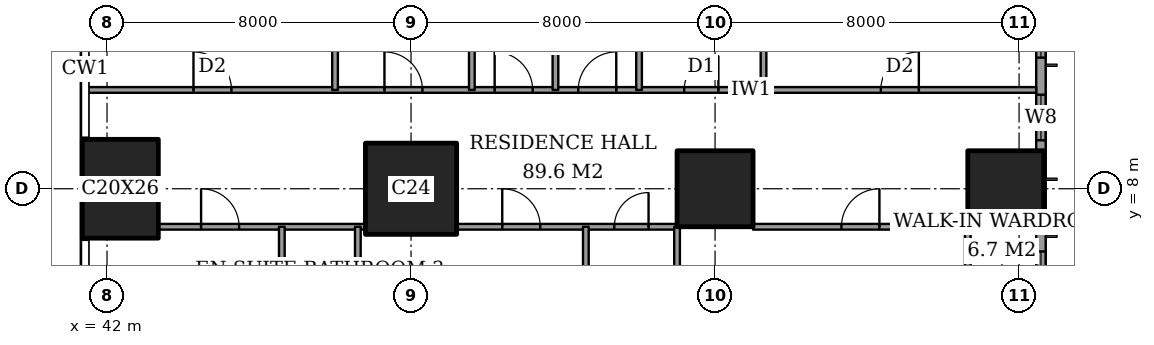
"""IFC4 building model, lengths in metres.
Left out: names, types, materials, properties, quantities, classifications, styles, units other than length and angle.
Written with IfcOpenShell. Run it as: python <this file> out.ifc"""

import sys

from ifc_helpers import new_model, si_unit, direction, frame, frame_2d, origin, origin_2d, place, context, subcontext, project, spatial, rectangle, extrude, element, fill, save


model = new_model("IFC4")
c1 = context("Model", 3, precision=1e-05, world=origin(), true_north=direction((0.0, 1.0)))
c2 = subcontext(c1, "Body", "Model", "MODEL_VIEW")
j1 = project(units=[si_unit("LENGTHUNIT", "METRE"), si_unit("PLANEANGLEUNIT", "RADIAN")], contexts=[c1])
p1 = place(None, origin())
s1 = spatial("IfcSite", under=j1, at=p1, CompositionType="ELEMENT")
p2 = place(p1, origin())
s2 = spatial("IfcBuilding", under=s1, at=p2, CompositionType="ELEMENT")
p3 = place(p2, frame((0.0, 0.0, 76.4)))
s3 = spatial("IfcBuildingStorey", under=s2, at=p3, CompositionType="ELEMENT", Elevation=76.4)
p4 = place(p3, frame((42.35, 8.0, 0.0), z_axis=(0.0, 0.0, 1.0), x_axis=(1.0, 0.0, 0.0)))
e1 = element("IfcColumn", 1, at=p4, inside=s3, PredefinedType="COLUMN", context=c2, shape_type="SweptSolid", body=[
    extrude(rectangle(XDim=2.0, YDim=2.6, at=origin_2d()), origin(), (0.0, 0.0, 1.0), 3.6),
])
p5 = place(p3, frame((50.0, 8.0, 0.0), z_axis=(0.0, 0.0, 1.0), x_axis=(1.0, 0.0, 0.0)))
e2 = element("IfcColumn", 2, at=p5, inside=s3, PredefinedType="COLUMN", context=c2, shape_type="SweptSolid", body=[
    extrude(rectangle(XDim=2.4, YDim=2.4, at=origin_2d()), origin(), (0.0, 0.0, 1.0), 3.6),
])
for number, where, z_axis, x_axis in (
    (3, (58.0, 8.0, 0.0), (0.0, 0.0, 1.0), (1.0, 0.0, 0.0)),
    (4, (65.65, 8.0, 0.0), (0.0, 0.0, 1.0), (1.0, 0.0, 0.0)),
):
    element("IfcColumn", number, at=place(p3, frame(where, z_axis=z_axis, x_axis=x_axis)), inside=s3, PredefinedType="COLUMN", context=c2, shape_type="SweptSolid", body=[
        extrude(rectangle(XDim=2.0, YDim=2.0, at=origin_2d()), origin(), (0.0, 0.0, 1.0), 3.6),
    ])
p6 = place(p3, frame((66.575, 3.175, 0.0), z_axis=(0.0, 0.0, 1.0), x_axis=(0.0, 1.0, 0.0)))
e5 = element("IfcWall", 5, at=p6, inside=s3, PredefinedType="SOLIDWALL", context=c2, shape_type="SweptSolid", body=[
    extrude(rectangle(XDim=41.65, YDim=0.25, at=frame_2d((20.825, 0.0))), origin(), (0.0, 0.0, 1.0), 3.6),
])
p7 = place(p6, frame((0.775, 0.0, 0.6)))
e6 = element("IfcOpeningElement", 6, at=p7, cuts=e5, PredefinedType="OPENING", context=c2, shape_type="SweptSolid", body=[
    extrude(rectangle(XDim=2.4, YDim=2.0, at=frame_2d((1.2, 1.0))), frame((0.0, 0.135, 0.0), z_axis=(0.0, -1.0, 0.0), x_axis=(1.0, 0.0, 0.0)), (0.0, 0.0, 1.0), 0.27),
])
p8 = place(p6, frame((6.1, 0.0, 0.6)))
e7 = element("IfcOpeningElement", 7, at=p8, cuts=e5, PredefinedType="OPENING", context=c2, shape_type="SweptSolid", body=[
    extrude(rectangle(XDim=1.2, YDim=2.0, at=frame_2d((0.6, 1.0))), frame((0.0, 0.135, 0.0), z_axis=(0.0, -1.0, 0.0), x_axis=(1.0, 0.0, 0.0)), (0.0, 0.0, 1.0), 0.27),
])
p9 = place(p6, frame((8.275, 0.0, 0.6)))
e8 = element("IfcOpeningElement", 8, at=p9, cuts=e5, PredefinedType="OPENING", context=c2, shape_type="SweptSolid", body=[
    extrude(rectangle(XDim=2.4, YDim=2.0, at=frame_2d((1.2, 1.0))), frame((0.0, 0.135, 0.0), z_axis=(0.0, -1.0, 0.0), x_axis=(1.0, 0.0, 0.0)), (0.0, 0.0, 1.0), 0.27),
])
p10 = place(p6, frame((15.775, 0.0, 0.6)))
e9 = element("IfcOpeningElement", 9, at=p10, cuts=e5, PredefinedType="OPENING", context=c2, shape_type="SweptSolid", body=[
    extrude(rectangle(XDim=2.4, YDim=2.0, at=frame_2d((1.2, 1.0))), frame((0.0, 0.135, 0.0), z_axis=(0.0, -1.0, 0.0), x_axis=(1.0, 0.0, 0.0)), (0.0, 0.0, 1.0), 0.27),
])
p11 = place(p6, frame((23.475, 0.0, 0.6)))
e10 = element("IfcOpeningElement", 10, at=p11, cuts=e5, PredefinedType="OPENING", context=c2, shape_type="SweptSolid", body=[
    extrude(rectangle(XDim=2.4, YDim=2.0, at=frame_2d((1.2, 1.0))), frame((0.0, 0.135, 0.0), z_axis=(0.0, -1.0, 0.0), x_axis=(1.0, 0.0, 0.0)), (0.0, 0.0, 1.0), 0.27),
])
p12 = place(p6, frame((30.975, 0.0, 0.6)))
e11 = element("IfcOpeningElement", 11, at=p12, cuts=e5, PredefinedType="OPENING", context=c2, shape_type="SweptSolid", body=[
    extrude(rectangle(XDim=2.4, YDim=2.0, at=frame_2d((1.2, 1.0))), frame((0.0, 0.135, 0.0), z_axis=(0.0, -1.0, 0.0), x_axis=(1.0, 0.0, 0.0)), (0.0, 0.0, 1.0), 0.27),
])
p13 = place(p6, frame((34.5, 0.0, 0.6)))
e12 = element("IfcOpeningElement", 12, at=p13, cuts=e5, PredefinedType="OPENING", context=c2, shape_type="SweptSolid", body=[
    extrude(rectangle(XDim=1.2, YDim=2.0, at=frame_2d((0.6, 1.0))), frame((0.0, 0.135, 0.0), z_axis=(0.0, -1.0, 0.0), x_axis=(1.0, 0.0, 0.0)), (0.0, 0.0, 1.0), 0.27),
])
p14 = place(p6, frame((38.475, 0.0, 0.6)))
e13 = element("IfcOpeningElement", 13, at=p14, cuts=e5, PredefinedType="OPENING", context=c2, shape_type="SweptSolid", body=[
    extrude(rectangle(XDim=2.4, YDim=2.0, at=frame_2d((1.2, 1.0))), frame((0.0, 0.135, 0.0), z_axis=(0.0, -1.0, 0.0), x_axis=(1.0, 0.0, 0.0)), (0.0, 0.0, 1.0), 0.27),
])
p15 = place(p3, frame((43.35, 7.0, 0.0), z_axis=(0.0, 0.0, 1.0), x_axis=(1.0, 0.0, 0.0)))
e14 = element("IfcWall", 14, at=p15, inside=s3, PredefinedType="PARTITIONING", context=c2, shape_type="SweptSolid", body=[
    extrude(rectangle(XDim=5.45, YDim=0.15, at=frame_2d((2.725, 0.0))), origin(), (0.0, 0.0, 1.0), 3.35),
])
p16 = place(p15, frame((1.125, 0.0, 0.0)))
e15 = element("IfcOpeningElement", 15, at=p16, cuts=e14, PredefinedType="OPENING", context=c2, shape_type="SweptSolid", body=[
    extrude(rectangle(XDim=1.0, YDim=2.1, at=frame_2d((0.5, 1.05))), frame((0.0, 0.085, 0.0), z_axis=(0.0, -1.0, 0.0), x_axis=(1.0, 0.0, 0.0)), (0.0, 0.0, 1.0), 0.17),
])
p17 = place(p3, frame((51.2, 7.0, 0.0), z_axis=(0.0, 0.0, 1.0), x_axis=(1.0, 0.0, 0.0)))
e16 = element("IfcWall", 16, at=p17, inside=s3, PredefinedType="PARTITIONING", context=c2, shape_type="SweptSolid", body=[
    extrude(rectangle(XDim=5.8, YDim=0.15, at=frame_2d((2.9, 0.0))), origin(), (0.0, 0.0, 1.0), 3.35),
])
p18 = place(p17, frame((4.15, 0.0, 0.0)))
e17 = element("IfcOpeningElement", 17, at=p18, cuts=e16, PredefinedType="OPENING", context=c2, shape_type="SweptSolid", body=[
    extrude(rectangle(XDim=0.9, YDim=2.1, at=frame_2d((0.45, 1.05))), frame((0.0, 0.085, 0.0), z_axis=(0.0, -1.0, 0.0), x_axis=(1.0, 0.0, 0.0)), (0.0, 0.0, 1.0), 0.17),
])
p19 = place(p17, frame((1.2, 0.0, 0.0)))
e18 = element("IfcOpeningElement", 18, at=p19, cuts=e16, PredefinedType="OPENING", context=c2, shape_type="SweptSolid", body=[
    extrude(rectangle(XDim=1.0, YDim=2.1, at=frame_2d((0.5, 1.05))), frame((0.0, 0.085, 0.0), z_axis=(0.0, -1.0, 0.0), x_axis=(1.0, 0.0, 0.0)), (0.0, 0.0, 1.0), 0.17),
])
p20 = place(p3, frame((59.0, 7.0, 0.0), z_axis=(0.0, 0.0, 1.0), x_axis=(1.0, 0.0, 0.0)))
e19 = element("IfcWall", 19, at=p20, inside=s3, PredefinedType="PARTITIONING", context=c2, shape_type="SweptSolid", body=[
    extrude(rectangle(XDim=5.65, YDim=0.15, at=frame_2d((2.825, 0.0))), origin(), (0.0, 0.0, 1.0), 3.35),
])
p21 = place(p20, frame((2.325, 0.0, 0.0)))
e20 = element("IfcOpeningElement", 20, at=p21, cuts=e19, PredefinedType="OPENING", context=c2, shape_type="SweptSolid", body=[
    extrude(rectangle(XDim=1.0, YDim=2.1, at=frame_2d((0.5, 1.05))), frame((0.0, 0.085, 0.0), z_axis=(0.0, -1.0, 0.0), x_axis=(1.0, 0.0, 0.0)), (0.0, 0.0, 1.0), 0.17),
])
p22 = place(p3, frame((41.439, 10.6, 0.0), z_axis=(0.0, 0.0, 1.0), x_axis=(1.0, 0.0, 0.0)))
e21 = element("IfcWall", 21, at=p22, inside=s3, PredefinedType="PARTITIONING", context=c2, shape_type="SweptSolid", body=[
    extrude(rectangle(XDim=25.011, YDim=0.15, at=frame_2d((12.505, 0.0))), origin(), (0.0, 0.0, 1.0), 3.35),
])
p23 = place(p22, frame((10.761, 0.0, 0.0)))
e22 = element("IfcOpeningElement", 22, at=p23, cuts=e21, PredefinedType="OPENING", context=c2, shape_type="SweptSolid", body=[
    extrude(rectangle(XDim=1.0, YDim=2.1, at=frame_2d((0.5, 1.05))), frame((0.0, 0.085, 0.0), z_axis=(0.0, -1.0, 0.0), x_axis=(1.0, 0.0, 0.0)), (0.0, 0.0, 1.0), 0.17),
])
p24 = place(p22, frame((20.924, 0.0, 0.0)))
e23 = element("IfcOpeningElement", 23, at=p24, cuts=e21, PredefinedType="OPENING", context=c2, shape_type="SweptSolid", body=[
    extrude(rectangle(XDim=1.0, YDim=2.1, at=frame_2d((0.5, 1.05))), frame((0.0, 0.085, 0.0), z_axis=(0.0, -1.0, 0.0), x_axis=(1.0, 0.0, 0.0)), (0.0, 0.0, 1.0), 0.17),
])
p25 = place(p22, frame((15.749, 0.0, 0.0)))
e24 = element("IfcOpeningElement", 24, at=p25, cuts=e21, PredefinedType="OPENING", context=c2, shape_type="SweptSolid", body=[
    extrude(rectangle(XDim=0.9, YDim=2.1, at=frame_2d((0.45, 1.05))), frame((0.0, 0.085, 0.0), z_axis=(0.0, -1.0, 0.0), x_axis=(1.0, 0.0, 0.0)), (0.0, 0.0, 1.0), 0.17),
])
p26 = place(p22, frame((12.961, 0.0, 0.0)))
e25 = element("IfcOpeningElement", 25, at=p26, cuts=e21, PredefinedType="OPENING", context=c2, shape_type="SweptSolid", body=[
    extrude(rectangle(XDim=1.0, YDim=2.1, at=frame_2d((0.5, 1.05))), frame((0.0, 0.085, 0.0), z_axis=(0.0, -1.0, 0.0), x_axis=(1.0, 0.0, 0.0)), (0.0, 0.0, 1.0), 0.17),
])
p27 = place(p22, frame((7.861, 0.0, 0.0)))
e26 = element("IfcOpeningElement", 26, at=p27, cuts=e21, PredefinedType="OPENING", context=c2, shape_type="SweptSolid", body=[
    extrude(rectangle(XDim=1.0, YDim=2.1, at=frame_2d((0.5, 1.05))), frame((0.0, 0.085, 0.0), z_axis=(0.0, -1.0, 0.0), x_axis=(1.0, 0.0, 0.0)), (0.0, 0.0, 1.0), 0.17),
])
p28 = place(p22, frame((2.836, 0.0, 0.0)))
e27 = element("IfcOpeningElement", 27, at=p28, cuts=e21, PredefinedType="OPENING", context=c2, shape_type="SweptSolid", body=[
    extrude(rectangle(XDim=1.0, YDim=2.1, at=frame_2d((0.5, 1.05))), frame((0.0, 0.085, 0.0), z_axis=(0.0, -1.0, 0.0), x_axis=(1.0, 0.0, 0.0)), (0.0, 0.0, 1.0), 0.17),
])
p29 = place(p3, frame((46.6, -0.45, 0.0), z_axis=(0.0, 0.0, 1.0), x_axis=(0.0, 1.0, 0.0)))
e28 = element("IfcWall", 28, at=p29, inside=s3, PredefinedType="PARTITIONING", context=c2, shape_type="SweptSolid", body=[
    extrude(rectangle(XDim=7.45, YDim=0.15, at=frame_2d((3.725, 0.0))), origin(), (0.0, 0.0, 1.0), 3.35),
])
p30 = place(p29, frame((3.275, 0.0, 0.0)))
e29 = element("IfcOpeningElement", 29, at=p30, cuts=e28, PredefinedType="OPENING", context=c2, shape_type="SweptSolid", body=[
    extrude(rectangle(XDim=0.9, YDim=2.1, at=frame_2d((0.45, 1.05))), frame((0.0, 0.085, 0.0), z_axis=(0.0, -1.0, 0.0), x_axis=(1.0, 0.0, 0.0)), (0.0, 0.0, 1.0), 0.17),
])
p31 = place(p3, frame((48.0, 10.6, 0.0), z_axis=(0.0, 0.0, 1.0), x_axis=(0.0, 1.0, 0.0)))
e30 = element("IfcWall", 30, at=p31, inside=s3, PredefinedType="PARTITIONING", context=c2, shape_type="SweptSolid", body=[
    extrude(rectangle(XDim=6.4, YDim=0.15, at=frame_2d((3.2, 0.0))), origin(), (0.0, 0.0, 1.0), 3.35),
])
p32 = place(p3, frame((48.6, -0.45, 0.0), z_axis=(0.0, 0.0, 1.0), x_axis=(0.0, 1.0, 0.0)))
e31 = element("IfcWall", 31, at=p32, inside=s3, PredefinedType="PARTITIONING", context=c2, shape_type="SweptSolid", body=[
    extrude(rectangle(XDim=7.45, YDim=0.15, at=frame_2d((3.725, 0.0))), origin(), (0.0, 0.0, 1.0), 3.35),
])
for number, where, z_axis, x_axis in (
    (32, (51.6, 10.6, 0.0), (0.0, 0.0, 1.0), (0.0, 1.0, 0.0)),
    (33, (53.8, 10.6, 0.0), (0.0, 0.0, 1.0), (0.0, 1.0, 0.0)),
):
    element("IfcWall", number, at=place(p3, frame(where, z_axis=z_axis, x_axis=x_axis)), inside=s3, PredefinedType="PARTITIONING", context=c2, shape_type="SweptSolid", body=[
        extrude(rectangle(XDim=6.4, YDim=0.15, at=frame_2d((3.2, 0.0))), origin(), (0.0, 0.0, 1.0), 3.35),
    ])
p33 = place(p3, frame((54.6, -0.45, 0.0), z_axis=(0.0, 0.0, 1.0), x_axis=(0.0, 1.0, 0.0)))
e34 = element("IfcWall", 34, at=p33, inside=s3, PredefinedType="PARTITIONING", context=c2, shape_type="SweptSolid", body=[
    extrude(rectangle(XDim=7.45, YDim=0.15, at=frame_2d((3.725, 0.0))), origin(), (0.0, 0.0, 1.0), 3.35),
])
p34 = place(p3, frame((56.0, 10.6, 0.0), z_axis=(0.0, 0.0, 1.0), x_axis=(0.0, 1.0, 0.0)))
e35 = element("IfcWall", 35, at=p34, inside=s3, PredefinedType="PARTITIONING", context=c2, shape_type="SweptSolid", body=[
    extrude(rectangle(XDim=11.0, YDim=0.15, at=frame_2d((5.5, 0.0))), origin(), (0.0, 0.0, 1.0), 3.35),
])
p35 = place(p34, frame((8.2, 0.0, 0.0)))
e36 = element("IfcOpeningElement", 36, at=p35, cuts=e35, PredefinedType="OPENING", context=c2, shape_type="SweptSolid", body=[
    extrude(rectangle(XDim=1.0, YDim=2.1, at=frame_2d((0.5, 1.05))), frame((0.0, 0.085, 0.0), z_axis=(0.0, -1.0, 0.0), x_axis=(1.0, 0.0, 0.0)), (0.0, 0.0, 1.0), 0.17),
])
p36 = place(p3, frame((57.0, 1.35, 0.0), z_axis=(0.0, 0.0, 1.0), x_axis=(0.0, 1.0, 0.0)))
e37 = element("IfcWall", 37, at=p36, inside=s3, PredefinedType="PARTITIONING", context=c2, shape_type="SweptSolid", body=[
    extrude(rectangle(XDim=5.65, YDim=0.15, at=frame_2d((2.825, 0.0))), origin(), (0.0, 0.0, 1.0), 3.35),
])
p37 = place(p3, frame((59.275, 10.6, 0.0), z_axis=(0.0, 0.0, 1.0), x_axis=(0.0, 1.0, 0.0)))
e38 = element("IfcWall", 38, at=p37, inside=s3, PredefinedType="PARTITIONING", context=c2, shape_type="SweptSolid", body=[
    extrude(rectangle(XDim=4.2, YDim=0.15, at=frame_2d((2.1, 0.0))), origin(), (0.0, 0.0, 1.0), 3.35),
])
p38 = place(p3, frame((64.65, 3.3, 0.0), z_axis=(0.0, 0.0, 1.0), x_axis=(0.0, 1.0, 0.0)))
e39 = element("IfcWall", 39, at=p38, inside=s3, PredefinedType="PARTITIONING", context=c2, shape_type="SweptSolid", body=[
    extrude(rectangle(XDim=3.7, YDim=0.15, at=frame_2d((1.85, 0.0))), origin(), (0.0, 0.0, 1.0), 3.35),
])
p39 = place(p38, frame((1.4, 0.0, 0.0)))
e40 = element("IfcOpeningElement", 40, at=p39, cuts=e39, PredefinedType="OPENING", context=c2, shape_type="SweptSolid", body=[
    extrude(rectangle(XDim=0.9, YDim=2.1, at=frame_2d((0.45, 1.05))), frame((0.0, 0.085, 0.0), z_axis=(0.0, -1.0, 0.0), x_axis=(1.0, 0.0, 0.0)), (0.0, 0.0, 1.0), 0.17),
])
p40 = place(p7, origin())
e41 = element("IfcWindow", 41, at=p40, inside=s3, PartitioningType="SINGLE_PANEL", PredefinedType="WINDOW", context=c2, shape_type="SweptSolid", body=[
    extrude(rectangle(XDim=2.4, YDim=2.0, at=frame_2d((1.2, 1.0))), frame((0.0, 0.03, 0.0), z_axis=(0.0, -1.0, 0.0), x_axis=(1.0, 0.0, 0.0)), (0.0, 0.0, 1.0), 0.06),
])
fill(e6, e41)
p41 = place(p8, origin())
e42 = element("IfcWindow", 42, at=p41, inside=s3, PartitioningType="SINGLE_PANEL", PredefinedType="WINDOW", context=c2, shape_type="SweptSolid", body=[
    extrude(rectangle(XDim=1.2, YDim=2.0, at=frame_2d((0.6, 1.0))), frame((0.0, 0.03, 0.0), z_axis=(0.0, -1.0, 0.0), x_axis=(1.0, 0.0, 0.0)), (0.0, 0.0, 1.0), 0.06),
])
fill(e7, e42)
p42 = place(p9, origin())
e43 = element("IfcWindow", 43, at=p42, inside=s3, PartitioningType="SINGLE_PANEL", PredefinedType="WINDOW", context=c2, shape_type="SweptSolid", body=[
    extrude(rectangle(XDim=2.4, YDim=2.0, at=frame_2d((1.2, 1.0))), frame((0.0, 0.03, 0.0), z_axis=(0.0, -1.0, 0.0), x_axis=(1.0, 0.0, 0.0)), (0.0, 0.0, 1.0), 0.06),
])
fill(e8, e43)
p43 = place(p21, origin())
e44 = element("IfcDoor", 44, at=p43, inside=s3, OperationType="SINGLE_SWING_LEFT", PredefinedType="DOOR", context=c2, shape_type="SweptSolid", body=[
    extrude(rectangle(XDim=1.0, YDim=2.1, at=frame_2d((0.5, 1.05))), frame((0.0, 0.025, 0.0), z_axis=(0.0, -1.0, 0.0), x_axis=(1.0, 0.0, 0.0)), (0.0, 0.0, 1.0), 0.05),
])
fill(e20, e44)
p44 = place(p18, origin())
e45 = element("IfcDoor", 45, at=p44, inside=s3, OperationType="SINGLE_SWING_LEFT", PredefinedType="DOOR", context=c2, shape_type="SweptSolid", body=[
    extrude(rectangle(XDim=0.9, YDim=2.1, at=frame_2d((0.45, 1.05))), frame((0.0, 0.025, 0.0), z_axis=(0.0, -1.0, 0.0), x_axis=(1.0, 0.0, 0.0)), (0.0, 0.0, 1.0), 0.05),
])
fill(e17, e45)
p45 = place(p19, origin())
e46 = element("IfcDoor", 46, at=p45, inside=s3, OperationType="SINGLE_SWING_RIGHT", PredefinedType="DOOR", context=c2, shape_type="SweptSolid", body=[
    extrude(rectangle(XDim=1.0, YDim=2.1, at=frame_2d((0.5, 1.05))), frame((0.0, 0.025, 0.0), z_axis=(0.0, -1.0, 0.0), x_axis=(1.0, 0.0, 0.0)), (0.0, 0.0, 1.0), 0.05),
])
fill(e18, e46)
p46 = place(p16, origin())
e47 = element("IfcDoor", 47, at=p46, inside=s3, OperationType="SINGLE_SWING_RIGHT", PredefinedType="DOOR", context=c2, shape_type="SweptSolid", body=[
    extrude(rectangle(XDim=1.0, YDim=2.1, at=frame_2d((0.5, 1.05))), frame((0.0, 0.025, 0.0), z_axis=(0.0, -1.0, 0.0), x_axis=(1.0, 0.0, 0.0)), (0.0, 0.0, 1.0), 0.05),
])
fill(e15, e47)
p47 = place(p23, origin())
e48 = element("IfcDoor", 48, at=p47, inside=s3, OperationType="SINGLE_SWING_RIGHT", PredefinedType="DOOR", context=c2, shape_type="SweptSolid", body=[
    extrude(rectangle(XDim=1.0, YDim=2.1, at=frame_2d((0.5, 1.05))), frame((0.0, 0.025, 0.0), z_axis=(0.0, -1.0, 0.0), x_axis=(1.0, 0.0, 0.0)), (0.0, 0.0, 1.0), 0.05),
])
fill(e22, e48)
p48 = place(p24, origin())
e49 = element("IfcDoor", 49, at=p48, inside=s3, OperationType="SINGLE_SWING_LEFT", PredefinedType="DOOR", context=c2, shape_type="SweptSolid", body=[
    extrude(rectangle(XDim=1.0, YDim=2.1, at=frame_2d((0.5, 1.05))), frame((0.0, 0.025, 0.0), z_axis=(0.0, -1.0, 0.0), x_axis=(1.0, 0.0, 0.0)), (0.0, 0.0, 1.0), 0.05),
])
fill(e23, e49)
p49 = place(p25, origin())
e50 = element("IfcDoor", 50, at=p49, inside=s3, OperationType="SINGLE_SWING_LEFT", PredefinedType="DOOR", context=c2, shape_type="SweptSolid", body=[
    extrude(rectangle(XDim=0.9, YDim=2.1, at=frame_2d((0.45, 1.05))), frame((0.0, 0.025, 0.0), z_axis=(0.0, -1.0, 0.0), x_axis=(1.0, 0.0, 0.0)), (0.0, 0.0, 1.0), 0.05),
])
fill(e24, e50)
p50 = place(p26, origin())
e51 = element("IfcDoor", 51, at=p50, inside=s3, OperationType="SINGLE_SWING_LEFT", PredefinedType="DOOR", context=c2, shape_type="SweptSolid", body=[
    extrude(rectangle(XDim=1.0, YDim=2.1, at=frame_2d((0.5, 1.05))), frame((0.0, 0.025, 0.0), z_axis=(0.0, -1.0, 0.0), x_axis=(1.0, 0.0, 0.0)), (0.0, 0.0, 1.0), 0.05),
])
fill(e25, e51)
p51 = place(p27, origin())
e52 = element("IfcDoor", 52, at=p51, inside=s3, OperationType="SINGLE_SWING_RIGHT", PredefinedType="DOOR", context=c2, shape_type="SweptSolid", body=[
    extrude(rectangle(XDim=1.0, YDim=2.1, at=frame_2d((0.5, 1.05))), frame((0.0, 0.025, 0.0), z_axis=(0.0, -1.0, 0.0), x_axis=(1.0, 0.0, 0.0)), (0.0, 0.0, 1.0), 0.05),
])
fill(e26, e52)
p52 = place(p28, origin())
e53 = element("IfcDoor", 53, at=p52, inside=s3, OperationType="SINGLE_SWING_RIGHT", PredefinedType="DOOR", context=c2, shape_type="SweptSolid", body=[
    extrude(rectangle(XDim=1.0, YDim=2.1, at=frame_2d((0.5, 1.05))), frame((0.0, 0.025, 0.0), z_axis=(0.0, -1.0, 0.0), x_axis=(1.0, 0.0, 0.0)), (0.0, 0.0, 1.0), 0.05),
])
fill(e27, e53)
save(model, sys.argv[1])
